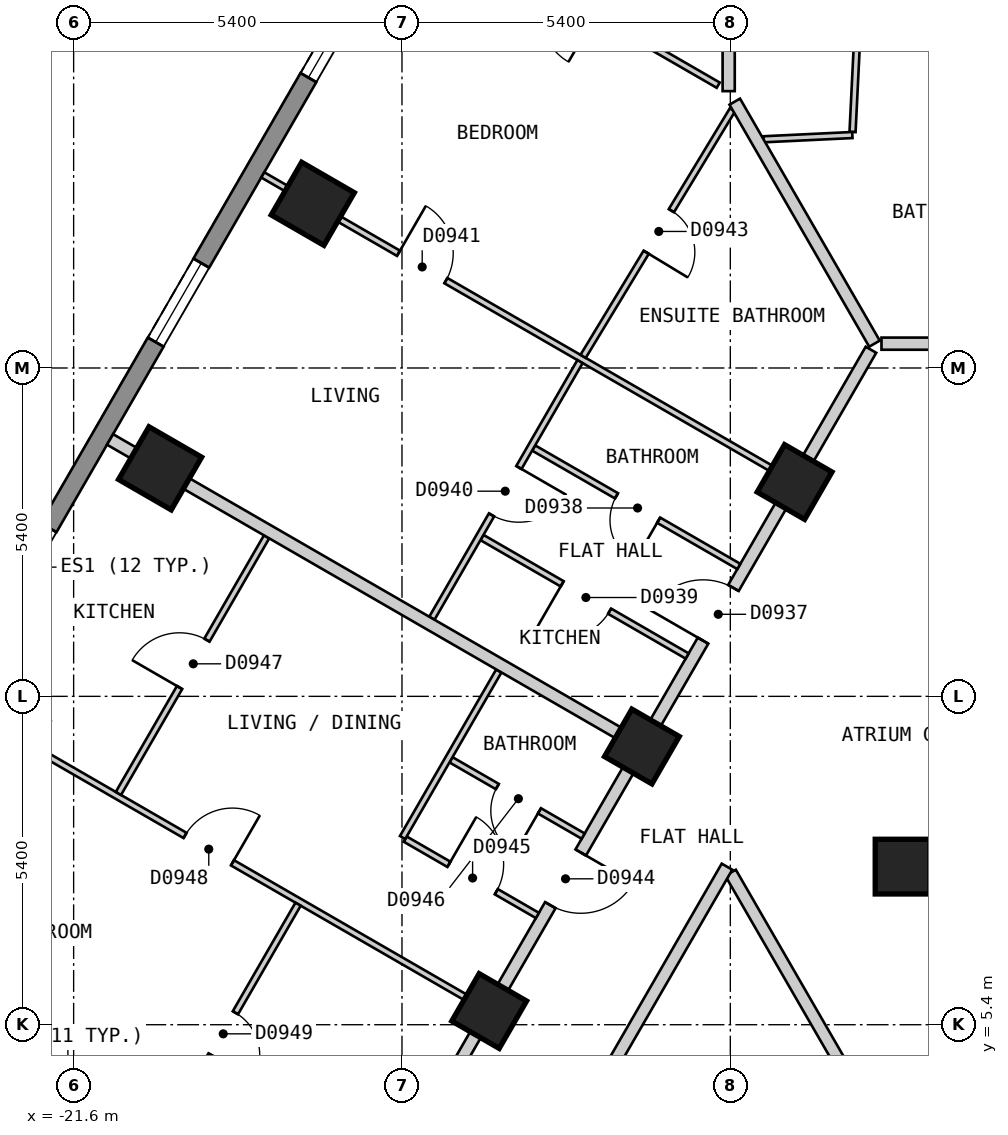
"""IFC4 building model, lengths in metres.
Left out: names, types, materials, properties, quantities, classifications, styles, units other than length and angle.
Written with IfcOpenShell. Run it as: python <this file> out.ifc"""

import sys

from ifc_helpers import new_model, si_unit, direction, frame, frame_2d, origin, origin_2d, place, context, subcontext, project, spatial, polyline, rectangle, outline, extrude, element, fill, save


model = new_model("IFC4")
c1 = context("Model", 3, precision=1e-05, world=origin(), true_north=direction((0.0, 1.0)))
c2 = subcontext(c1, "Body", "Model", "MODEL_VIEW")
j1 = project(units=[si_unit("LENGTHUNIT", "METRE"), si_unit("PLANEANGLEUNIT", "RADIAN")], contexts=[c1])
p1 = place(None, origin())
s1 = spatial("IfcSite", under=j1, at=p1, CompositionType="ELEMENT")
p2 = place(p1, origin())
s2 = spatial("IfcBuilding", under=s1, at=p2, CompositionType="ELEMENT")
p3 = place(p2, frame((0.0, 0.0, 102.0)))
s3 = spatial("IfcBuildingStorey", under=s2, at=p3, CompositionType="ELEMENT", Elevation=102.0)
for number, where, z_axis, x_axis in (
    (1, (-17.667, 18.9, 0.0), (0.0, 0.0, 1.0), (-0.5, -0.866, 0.0)),
    (2, (-20.178, 14.55, 0.0), (0.0, 0.0, 1.0), (-0.5, -0.866, 0.0)),
):
    element("IfcColumn", number, at=place(p3, frame(where, z_axis=z_axis, x_axis=x_axis)), inside=s3, PredefinedType="COLUMN", context=c2, shape_type="SweptSolid", body=[
        extrude(rectangle(XDim=1.0, YDim=1.0, at=origin_2d()), origin(), (0.0, 0.0, 1.0), 3.0),
    ])
for number, where, z_axis, x_axis in (
    (3, (-9.743, 14.325, 0.0), (0.0, 0.0, 1.0), (-0.5, -0.866, 0.0)),
    (4, (-7.967, 8.0, 0.0), (0.0, 0.0, 1.0), (1.0, 0.0, 0.0)),
    (5, (-12.254, 9.975, 0.0), (0.0, 0.0, 1.0), (-0.5, -0.866, 0.0)),
    (6, (-14.766, 5.625, 0.0), (0.0, 0.0, 1.0), (-0.5, -0.866, 0.0)),
):
    element("IfcColumn", number, at=place(p3, frame(where, z_axis=z_axis, x_axis=x_axis)), inside=s3, PredefinedType="COLUMN", context=c2, shape_type="SweptSolid", body=[
        extrude(rectangle(XDim=0.9, YDim=0.9, at=origin_2d()), origin(), (0.0, 0.0, 1.0), 3.0),
    ])
p4 = place(p3, frame((-15.747, 24.425, 0.0), z_axis=(0.0, 0.0, 1.0), x_axis=(-0.500027479704, -0.866009537788, 0.0)))
e7 = element("IfcWall", 7, at=p4, inside=s3, PredefinedType="SOLIDWALL", context=c2, shape_type="SweptSolid", body=[
    extrude(outline(polyline([(0.0, -0.15), (26.559, -0.15), (26.478, 0.15), (0.08, 0.15), (0.0, -0.15)])), origin(), (0.0, 0.0, 1.0), 2.7),
])
p5 = place(p4, frame((2.483, 0.0, 0.15)))
e8 = element("IfcOpeningElement", 8, at=p5, cuts=e7, PredefinedType="OPENING", context=c2, shape_type="SweptSolid", body=[
    extrude(rectangle(XDim=1.5, YDim=2.1, at=frame_2d((0.75, 1.05))), frame((0.0, 0.16, 0.0), z_axis=(0.0, -1.0, 0.0), x_axis=(1.0, 0.0, 0.0)), (0.0, 0.0, 1.0), 0.32),
])
p6 = place(p4, frame((7.506, 0.0, 0.15)))
e9 = element("IfcOpeningElement", 9, at=p6, cuts=e7, PredefinedType="OPENING", context=c2, shape_type="SweptSolid", body=[
    extrude(rectangle(XDim=1.5, YDim=2.1, at=frame_2d((0.75, 1.05))), frame((0.0, 0.16, 0.0), z_axis=(0.0, -1.0, 0.0), x_axis=(1.0, 0.0, 0.0)), (0.0, 0.0, 1.0), 0.32),
])
p7 = place(p4, frame((12.529, 0.0, 0.15)))
e10 = element("IfcOpeningElement", 10, at=p7, cuts=e7, PredefinedType="OPENING", context=c2, shape_type="SweptSolid", body=[
    extrude(rectangle(XDim=1.5, YDim=2.1, at=frame_2d((0.75, 1.05))), frame((0.0, 0.16, 0.0), z_axis=(0.0, -1.0, 0.0), x_axis=(1.0, 0.0, 0.0)), (0.0, 0.0, 1.0), 0.32),
])
p8 = place(p4, frame((17.552, 0.0, 0.15)))
e11 = element("IfcOpeningElement", 11, at=p8, cuts=e7, PredefinedType="OPENING", context=c2, shape_type="SweptSolid", body=[
    extrude(rectangle(XDim=1.5, YDim=2.1, at=frame_2d((0.75, 1.05))), frame((0.0, 0.16, 0.0), z_axis=(0.0, -1.0, 0.0), x_axis=(1.0, 0.0, 0.0)), (0.0, 0.0, 1.0), 0.32),
])
p9 = place(p4, frame((22.575, 0.0, 0.15)))
e12 = element("IfcOpeningElement", 12, at=p9, cuts=e7, PredefinedType="OPENING", context=c2, shape_type="SweptSolid", body=[
    extrude(rectangle(XDim=1.5, YDim=2.1, at=frame_2d((0.75, 1.05))), frame((0.0, 0.16, 0.0), z_axis=(0.0, -1.0, 0.0), x_axis=(1.0, 0.0, 0.0)), (0.0, 0.0, 1.0), 0.32),
])
p10 = place(p3, frame((-10.796, 7.899, 0.0), z_axis=(0.0, 0.0, 1.0), x_axis=(0.500010383074, -0.866019409031, 0.0)))
e13 = element("IfcWall", 13, at=p10, inside=s3, PredefinedType="PARTITIONING", context=c2, shape_type="SweptSolid", body=[
    extrude(rectangle(XDim=7.535, YDim=0.2, at=frame_2d((3.768, 0.0))), origin(), (0.0, 0.0, 1.0), 2.7),
])
p11 = place(p3, frame((-8.314, 16.6, 0.0), z_axis=(0.0, 0.0, 1.0), x_axis=(1.0, 0.0, 0.0)))
e14 = element("IfcWall", 14, at=p11, inside=s3, PredefinedType="PARTITIONING", context=c2, shape_type="SweptSolid", body=[
    extrude(rectangle(XDim=2.309, YDim=0.2, at=frame_2d((1.155, 0.0))), origin(), (0.0, 0.0, 1.0), 2.7),
])
p12 = place(p3, frame((-16.05, -1.0, 0.0), z_axis=(0.0, 0.0, 1.0), x_axis=(0.499962449088, 0.866047082728, 0.0)))
e15 = element("IfcWall", 15, at=p12, inside=s3, PredefinedType="PARTITIONING", context=c2, shape_type="SweptSolid", body=[
    extrude(rectangle(XDim=10.391, YDim=0.2, at=frame_2d((5.195, 0.0))), origin(), (0.0, 0.0, 1.0), 2.7),
])
p13 = place(p12, frame((4.745, 0.0, 0.0)))
e16 = element("IfcOpeningElement", 16, at=p13, cuts=e15, PredefinedType="OPENING", context=c2, shape_type="SweptSolid", body=[
    extrude(rectangle(XDim=0.9, YDim=2.1, at=frame_2d((0.45, 1.05))), frame((0.0, 0.11, 0.0), z_axis=(0.0, -1.0, 0.0), x_axis=(1.0, 0.0, 0.0)), (0.0, 0.0, 1.0), 0.22),
])
p14 = place(p3, frame((-18.562, -0.951, 0.0), z_axis=(0.0, 0.0, 1.0), x_axis=(0.499987097491, 0.866032852923, 0.0)))
e17 = element("IfcWall", 17, at=p14, inside=s3, PredefinedType="PARTITIONING", context=c2, shape_type="SweptSolid", body=[
    extrude(rectangle(XDim=20.15, YDim=0.2, at=frame_2d((10.075, 0.0))), origin(), (0.0, 0.0, 1.0), 2.7),
])
p15 = place(p14, frame((14.627, 0.0, 0.0)))
e18 = element("IfcOpeningElement", 18, at=p15, cuts=e17, PredefinedType="OPENING", context=c2, shape_type="SweptSolid", body=[
    extrude(rectangle(XDim=1.0, YDim=2.1, at=frame_2d((0.5, 1.05))), frame((0.0, 0.11, 0.0), z_axis=(0.0, -1.0, 0.0), x_axis=(1.0, 0.0, 0.0)), (0.0, 0.0, 1.0), 0.22),
])
p16 = place(p14, frame((9.604, 0.0, 0.0)))
e19 = element("IfcOpeningElement", 19, at=p16, cuts=e17, PredefinedType="OPENING", context=c2, shape_type="SweptSolid", body=[
    extrude(rectangle(XDim=1.0, YDim=2.1, at=frame_2d((0.5, 1.05))), frame((0.0, 0.11, 0.0), z_axis=(0.0, -1.0, 0.0), x_axis=(1.0, 0.0, 0.0)), (0.0, 0.0, 1.0), 0.22),
])
p17 = place(p3, frame((-16.146, 8.452, 0.0), z_axis=(0.0, 0.0, 1.0), x_axis=(0.865983051302, -0.500073349477, 0.0)))
e20 = element("IfcWall", 20, at=p17, inside=s3, PredefinedType="PARTITIONING", context=c2, shape_type="SweptSolid", body=[
    extrude(rectangle(XDim=2.509, YDim=0.1, at=frame_2d((1.255, 0.0))), origin(), (0.0, 0.0, 1.0), 2.7),
])
p18 = place(p17, frame((0.829, 0.0, 0.0)))
e21 = element("IfcOpeningElement", 21, at=p18, cuts=e20, PredefinedType="OPENING", context=c2, shape_type="SweptSolid", body=[
    extrude(rectangle(XDim=0.9, YDim=2.1, at=frame_2d((0.45, 1.05))), frame((0.0, 0.06, 0.0), z_axis=(0.0, -1.0, 0.0), x_axis=(1.0, 0.0, 0.0)), (0.0, 0.0, 1.0), 0.12),
])
p19 = place(p3, frame((-23.513, 10.675, 0.0), z_axis=(0.0, 0.0, 1.0), x_axis=(0.866041268327, -0.499972520799, 0.0)))
e22 = element("IfcWall", 22, at=p19, inside=s3, PredefinedType="PARTITIONING", context=c2, shape_type="SweptSolid", body=[
    extrude(rectangle(XDim=10.0, YDim=0.1, at=frame_2d((5.0, 0.0))), origin(), (0.0, 0.0, 1.0), 2.7),
])
p20 = place(p19, frame((4.325, 0.0, 0.0)))
e23 = element("IfcOpeningElement", 23, at=p20, cuts=e22, PredefinedType="OPENING", context=c2, shape_type="SweptSolid", body=[
    extrude(rectangle(XDim=0.9, YDim=2.1, at=frame_2d((0.45, 1.05))), frame((0.0, 0.06, 0.0), z_axis=(0.0, -1.0, 0.0), x_axis=(1.0, 0.0, 0.0)), (0.0, 0.0, 1.0), 0.12),
])
p21 = place(p3, frame((-14.884, 13.412, 0.0), z_axis=(0.0, 0.0, 1.0), x_axis=(0.866024880635, -0.500000906121, 0.0)))
e24 = element("IfcWall", 24, at=p21, inside=s3, PredefinedType="PARTITIONING", context=c2, shape_type="SweptSolid", body=[
    extrude(rectangle(XDim=3.896, YDim=0.1, at=frame_2d((1.948, 0.0))), origin(), (0.0, 0.0, 1.0), 2.7),
])
p22 = place(p21, frame((1.523, 0.0, 0.0)))
e25 = element("IfcOpeningElement", 25, at=p22, cuts=e24, PredefinedType="OPENING", context=c2, shape_type="SweptSolid", body=[
    extrude(rectangle(XDim=0.9, YDim=2.1, at=frame_2d((0.45, 1.05))), frame((0.0, 0.06, 0.0), z_axis=(0.0, -1.0, 0.0), x_axis=(1.0, 0.0, 0.0)), (0.0, 0.0, 1.0), 0.12),
])
p23 = place(p3, frame((-14.034, 14.884, 0.0), z_axis=(0.0, 0.0, 1.0), x_axis=(0.866024880635, -0.500000906121, 0.0)))
e26 = element("IfcWall", 26, at=p23, inside=s3, PredefinedType="PARTITIONING", context=c2, shape_type="SweptSolid", body=[
    extrude(rectangle(XDim=3.896, YDim=0.1, at=frame_2d((1.948, 0.0))), origin(), (0.0, 0.0, 1.0), 2.7),
])
p24 = place(p23, frame((1.573, 0.0, 0.0)))
e27 = element("IfcOpeningElement", 27, at=p24, cuts=e26, PredefinedType="OPENING", context=c2, shape_type="SweptSolid", body=[
    extrude(rectangle(XDim=0.8, YDim=2.1, at=frame_2d((0.4, 1.05))), frame((0.0, 0.06, 0.0), z_axis=(0.0, -1.0, 0.0), x_axis=(1.0, 0.0, 0.0)), (0.0, 0.0, 1.0), 0.12),
])
p25 = place(p3, frame((-15.394, 9.757, 0.0), z_axis=(0.0, 0.0, 1.0), x_axis=(0.866038211682, -0.499977815414, 0.0)))
e28 = element("IfcWall", 28, at=p25, inside=s3, PredefinedType="PARTITIONING", context=c2, shape_type="SweptSolid", body=[
    extrude(rectangle(XDim=2.51, YDim=0.1, at=frame_2d((1.255, 0.0))), origin(), (0.0, 0.0, 1.0), 2.7),
])
p26 = place(p25, frame((0.88, 0.0, 0.0)))
e29 = element("IfcOpeningElement", 29, at=p26, cuts=e28, PredefinedType="OPENING", context=c2, shape_type="SweptSolid", body=[
    extrude(rectangle(XDim=0.8, YDim=2.1, at=frame_2d((0.4, 1.05))), frame((0.0, 0.06, 0.0), z_axis=(0.0, -1.0, 0.0), x_axis=(1.0, 0.0, 0.0)), (0.0, 0.0, 1.0), 0.12),
])
p27 = place(p3, frame((-18.489, 19.375, 0.0), z_axis=(0.0, 0.0, 1.0), x_axis=(0.866016855193, -0.500014806302, 0.0)))
e30 = element("IfcWall", 30, at=p27, inside=s3, PredefinedType="PARTITIONING", context=c2, shape_type="SweptSolid", body=[
    extrude(rectangle(XDim=10.0, YDim=0.1, at=frame_2d((5.0, 0.0))), origin(), (0.0, 0.0, 1.0), 2.7),
])
p28 = place(p27, frame((2.577, 0.0, 0.0)))
e31 = element("IfcOpeningElement", 31, at=p28, cuts=e30, PredefinedType="OPENING", context=c2, shape_type="SweptSolid", body=[
    extrude(rectangle(XDim=0.9, YDim=2.1, at=frame_2d((0.45, 1.05))), frame((0.0, 0.06, 0.0), z_axis=(0.0, -1.0, 0.0), x_axis=(1.0, 0.0, 0.0)), (0.0, 0.0, 1.0), 0.12),
])
p29 = place(p3, frame((-15.977, 23.725, 0.0), z_axis=(0.0, 0.0, 1.0), x_axis=(0.866028566888, -0.499994521305, 0.0)))
e32 = element("IfcWall", 32, at=p29, inside=s3, PredefinedType="PARTITIONING", context=c2, shape_type="SweptSolid", body=[
    extrude(rectangle(XDim=5.748, YDim=0.1, at=frame_2d((2.874, 0.0))), origin(), (0.0, 0.0, 1.0), 2.7),
])
p30 = place(p29, frame((2.524, 0.0, 0.0)))
e33 = element("IfcOpeningElement", 33, at=p30, cuts=e32, PredefinedType="OPENING", context=c2, shape_type="SweptSolid", body=[
    extrude(rectangle(XDim=0.9, YDim=2.1, at=frame_2d((0.45, 1.05))), frame((0.0, 0.06, 0.0), z_axis=(0.0, -1.0, 0.0), x_axis=(1.0, 0.0, 0.0)), (0.0, 0.0, 1.0), 0.12),
])
p31 = place(p3, frame((-13.221, 16.391, 0.0), z_axis=(0.0, 0.0, 1.0), x_axis=(0.518164725284, 0.855280841286, 0.0)))
e34 = element("IfcWall", 34, at=p31, inside=s3, PredefinedType="PARTITIONING", context=c2, shape_type="SweptSolid", body=[
    extrude(rectangle(XDim=4.74, YDim=0.1, at=frame_2d((2.37, 0.0))), origin(), (0.0, 0.0, 1.0), 2.7),
])
p32 = place(p31, frame((2.002, 0.0, 0.0)))
e35 = element("IfcOpeningElement", 35, at=p32, cuts=e34, PredefinedType="OPENING", context=c2, shape_type="SweptSolid", body=[
    extrude(rectangle(XDim=0.8, YDim=2.1, at=frame_2d((0.4, 1.05))), frame((0.0, 0.06, 0.0), z_axis=(0.0, -1.0, 0.0), x_axis=(1.0, 0.0, 0.0)), (0.0, 0.0, 1.0), 0.12),
])
p33 = place(p3, frame((-16.19, 8.478, 0.0), z_axis=(0.0, 0.0, 1.0), x_axis=(0.500156715107, 0.865934905367, 0.0)))
e36 = element("IfcWall", 36, at=p33, inside=s3, PredefinedType="PARTITIONING", context=c2, shape_type="SweptSolid", body=[
    extrude(rectangle(XDim=3.163, YDim=0.1, at=frame_2d((1.582, 0.0))), origin(), (0.0, 0.0, 1.0), 2.7),
])
p34 = place(p3, frame((-20.345, 3.162, 0.0), z_axis=(0.0, 0.0, 1.0), x_axis=(0.499943653708, 0.866057932887, 0.0)))
e37 = element("IfcWall", 37, at=p34, inside=s3, PredefinedType="PARTITIONING", context=c2, shape_type="SweptSolid", body=[
    extrude(rectangle(XDim=4.873, YDim=0.1, at=frame_2d((2.436, 0.0))), origin(), (0.0, 0.0, 1.0), 2.7),
])
p35 = place(p34, frame((2.011, 0.0, 0.0)))
e38 = element("IfcOpeningElement", 38, at=p35, cuts=e37, PredefinedType="OPENING", context=c2, shape_type="SweptSolid", body=[
    extrude(rectangle(XDim=0.8, YDim=2.1, at=frame_2d((0.4, 1.05))), frame((0.0, 0.06, 0.0), z_axis=(0.0, -1.0, 0.0), x_axis=(1.0, 0.0, 0.0)), (0.0, 0.0, 1.0), 0.12),
])
p36 = place(p3, frame((-15.708, 12.085, 0.0), z_axis=(0.0, 0.0, 1.0), x_axis=(0.499943653708, 0.866057932887, 0.0)))
e39 = element("IfcWall", 39, at=p36, inside=s3, PredefinedType="PARTITIONING", context=c2, shape_type="SweptSolid", body=[
    extrude(rectangle(XDim=4.873, YDim=0.1, at=frame_2d((2.436, 0.0))), origin(), (0.0, 0.0, 1.0), 2.7),
])
p37 = place(p36, frame((1.962, 0.0, 0.0)))
e40 = element("IfcOpeningElement", 40, at=p37, cuts=e39, PredefinedType="OPENING", context=c2, shape_type="SweptSolid", body=[
    extrude(rectangle(XDim=0.9, YDim=2.1, at=frame_2d((0.45, 1.05))), frame((0.0, 0.06, 0.0), z_axis=(0.0, -1.0, 0.0), x_axis=(1.0, 0.0, 0.0)), (0.0, 0.0, 1.0), 0.12),
])
p38 = place(p3, frame((-20.864, 9.203, 0.0), z_axis=(0.0, 0.0, 1.0), x_axis=(0.500072260509, 0.86598368014, 0.0)))
e41 = element("IfcWall", 41, at=p38, inside=s3, PredefinedType="PARTITIONING", context=c2, shape_type="SweptSolid", body=[
    extrude(rectangle(XDim=4.873, YDim=0.1, at=frame_2d((2.437, 0.0))), origin(), (0.0, 0.0, 1.0), 2.7),
])
p39 = place(p38, frame((2.012, 0.0, 0.0)))
e42 = element("IfcOpeningElement", 42, at=p39, cuts=e41, PredefinedType="OPENING", context=c2, shape_type="SweptSolid", body=[
    extrude(rectangle(XDim=0.9, YDim=2.1, at=frame_2d((0.45, 1.05))), frame((0.0, 0.06, 0.0), z_axis=(0.0, -1.0, 0.0), x_axis=(1.0, 0.0, 0.0)), (0.0, 0.0, 1.0), 0.12),
])
p40 = place(p3, frame((-8.79, 20.081, 0.0), z_axis=(0.0, 0.0, 1.0), x_axis=(0.049097109821, 0.998794009697, 0.0)))
e43 = element("IfcWall", 43, at=p40, inside=s3, PredefinedType="PARTITIONING", context=c2, shape_type="SweptSolid", body=[
    extrude(rectangle(XDim=1.507, YDim=0.1, at=frame_2d((0.753, 0.0))), origin(), (0.0, 0.0, 1.0), 2.7),
])
p41 = place(p3, frame((-10.254, 19.961, 0.0), z_axis=(0.0, 0.0, 1.0), x_axis=(0.998851840647, 0.047906162812, 0.0)))
e44 = element("IfcWall", 44, at=p41, inside=s3, PredefinedType="PARTITIONING", context=c2, shape_type="SweptSolid", body=[
    extrude(rectangle(XDim=1.463, YDim=0.1, at=frame_2d((0.731, 0.0))), origin(), (0.0, 0.0, 1.0), 2.7),
])
p42 = place(p3, frame((-10.727, 20.58, 0.0), z_axis=(0.0, 0.0, 1.0), x_axis=(0.500041272028, -0.866001574057, 0.0)))
e45 = element("IfcWall", 45, at=p42, inside=s3, PredefinedType="PARTITIONING", context=c2, shape_type="SweptSolid", body=[
    extrude(rectangle(XDim=4.596, YDim=0.2, at=frame_2d((2.298, 0.0))), origin(), (0.0, 0.0, 1.0), 2.7),
])
p43 = place(p3, frame((-26.025, 6.325, 0.0), z_axis=(0.0, 0.0, 1.0), x_axis=(0.866041268327, -0.499972520799, 0.0)))
e46 = element("IfcWall", 46, at=p43, inside=s3, PredefinedType="PARTITIONING", context=c2, shape_type="SweptSolid", body=[
    extrude(rectangle(XDim=10.0, YDim=0.2, at=frame_2d((5.0, 0.0))), origin(), (0.0, 0.0, 1.0), 2.7),
])
p44 = place(p3, frame((-21.001, 15.025, 0.0), z_axis=(0.0, 0.0, 1.0), x_axis=(0.866016855193, -0.500014806302, 0.0)))
e47 = element("IfcWall", 47, at=p44, inside=s3, PredefinedType="PARTITIONING", context=c2, shape_type="SweptSolid", body=[
    extrude(rectangle(XDim=10.0, YDim=0.2, at=frame_2d((5.0, 0.0))), origin(), (0.0, 0.0, 1.0), 2.7),
])
p45 = place(p3, frame((-10.827, 20.753, 0.0), z_axis=(0.0, 0.0, 1.0), x_axis=(0.0, 1.0, 0.0)))
e48 = element("IfcWall", 48, at=p45, inside=s3, PredefinedType="PARTITIONING", context=c2, shape_type="SweptSolid", body=[
    extrude(rectangle(XDim=5.947, YDim=0.2, at=frame_2d((2.974, 0.0))), origin(), (0.0, 0.0, 1.0), 2.7),
])
p46 = place(p5, origin())
e49 = element("IfcWindow", 49, at=p46, inside=s3, PartitioningType="SINGLE_PANEL", PredefinedType="WINDOW", context=c2, shape_type="SweptSolid", body=[
    extrude(rectangle(XDim=1.5, YDim=2.1, at=frame_2d((0.75, 1.05))), frame((0.0, 0.03, 0.0), z_axis=(0.0, -1.0, 0.0), x_axis=(1.0, 0.0, 0.0)), (0.0, 0.0, 1.0), 0.06),
])
fill(e8, e49)
p47 = place(p6, origin())
e50 = element("IfcWindow", 50, at=p47, inside=s3, PartitioningType="SINGLE_PANEL", PredefinedType="WINDOW", context=c2, shape_type="SweptSolid", body=[
    extrude(rectangle(XDim=1.5, YDim=2.1, at=frame_2d((0.75, 1.05))), frame((0.0, 0.03, 0.0), z_axis=(0.0, -1.0, 0.0), x_axis=(1.0, 0.0, 0.0)), (0.0, 0.0, 1.0), 0.06),
])
fill(e9, e50)
p48 = place(p15, origin())
e51 = element("IfcDoor", 51, at=p48, inside=s3, OperationType="SINGLE_SWING_LEFT", PredefinedType="DOOR", context=c2, shape_type="SweptSolid", body=[
    extrude(rectangle(XDim=1.0, YDim=2.1, at=frame_2d((0.5, 1.05))), frame((0.0, 0.025, 0.0), z_axis=(0.0, -1.0, 0.0), x_axis=(1.0, 0.0, 0.0)), (0.0, 0.0, 1.0), 0.05),
])
fill(e18, e51)
p49 = place(p24, origin())
e52 = element("IfcDoor", 52, at=p49, inside=s3, OperationType="SINGLE_SWING_RIGHT", PredefinedType="DOOR", context=c2, shape_type="SweptSolid", body=[
    extrude(rectangle(XDim=0.8, YDim=2.1, at=frame_2d((0.4, 1.05))), frame((0.0, 0.025, 0.0), z_axis=(0.0, -1.0, 0.0), x_axis=(1.0, 0.0, 0.0)), (0.0, 0.0, 1.0), 0.05),
])
fill(e27, e52)
p50 = place(p22, origin())
e53 = element("IfcDoor", 53, at=p50, inside=s3, OperationType="SINGLE_SWING_LEFT", PredefinedType="DOOR", context=c2, shape_type="SweptSolid", body=[
    extrude(rectangle(XDim=0.9, YDim=2.1, at=frame_2d((0.45, 1.05))), frame((0.0, 0.025, 0.0), z_axis=(0.0, -1.0, 0.0), x_axis=(1.0, 0.0, 0.0)), (0.0, 0.0, 1.0), 0.05),
])
fill(e25, e53)
p51 = place(p37, origin())
e54 = element("IfcDoor", 54, at=p51, inside=s3, OperationType="SINGLE_SWING_RIGHT", PredefinedType="DOOR", context=c2, shape_type="SweptSolid", body=[
    extrude(rectangle(XDim=0.9, YDim=2.1, at=frame_2d((0.45, 1.05))), frame((0.0, 0.025, 0.0), z_axis=(0.0, -1.0, 0.0), x_axis=(1.0, 0.0, 0.0)), (0.0, 0.0, 1.0), 0.05),
])
fill(e40, e54)
p52 = place(p28, origin())
e55 = element("IfcDoor", 55, at=p52, inside=s3, OperationType="SINGLE_SWING_LEFT", PredefinedType="DOOR", context=c2, shape_type="SweptSolid", body=[
    extrude(rectangle(XDim=0.9, YDim=2.1, at=frame_2d((0.45, 1.05))), frame((0.0, 0.025, 0.0), z_axis=(0.0, -1.0, 0.0), x_axis=(1.0, 0.0, 0.0)), (0.0, 0.0, 1.0), 0.05),
])
fill(e31, e55)
p53 = place(p32, origin())
e56 = element("IfcDoor", 56, at=p53, inside=s3, OperationType="SINGLE_SWING_LEFT", PredefinedType="DOOR", context=c2, shape_type="SweptSolid", body=[
    extrude(rectangle(XDim=0.8, YDim=2.1, at=frame_2d((0.4, 1.05))), frame((0.0, 0.025, 0.0), z_axis=(0.0, -1.0, 0.0), x_axis=(1.0, 0.0, 0.0)), (0.0, 0.0, 1.0), 0.05),
])
fill(e35, e56)
p54 = place(p16, origin())
e57 = element("IfcDoor", 57, at=p54, inside=s3, OperationType="SINGLE_SWING_RIGHT", PredefinedType="DOOR", context=c2, shape_type="SweptSolid", body=[
    extrude(rectangle(XDim=1.0, YDim=2.1, at=frame_2d((0.5, 1.05))), frame((0.0, 0.025, 0.0), z_axis=(0.0, -1.0, 0.0), x_axis=(1.0, 0.0, 0.0)), (0.0, 0.0, 1.0), 0.05),
])
fill(e19, e57)
p55 = place(p18, origin())
e58 = element("IfcDoor", 58, at=p55, inside=s3, OperationType="SINGLE_SWING_LEFT", PredefinedType="DOOR", context=c2, shape_type="SweptSolid", body=[
    extrude(rectangle(XDim=0.9, YDim=2.1, at=frame_2d((0.45, 1.05))), frame((0.0, 0.025, 0.0), z_axis=(0.0, -1.0, 0.0), x_axis=(1.0, 0.0, 0.0)), (0.0, 0.0, 1.0), 0.05),
])
fill(e21, e58)
p56 = place(p26, origin())
e59 = element("IfcDoor", 59, at=p56, inside=s3, OperationType="SINGLE_SWING_RIGHT", PredefinedType="DOOR", context=c2, shape_type="SweptSolid", body=[
    extrude(rectangle(XDim=0.8, YDim=2.1, at=frame_2d((0.4, 1.05))), frame((0.0, 0.025, 0.0), z_axis=(0.0, -1.0, 0.0), x_axis=(1.0, 0.0, 0.0)), (0.0, 0.0, 1.0), 0.05),
])
fill(e29, e59)
p57 = place(p39, origin())
e60 = element("IfcDoor", 60, at=p57, inside=s3, OperationType="SINGLE_SWING_LEFT", PredefinedType="DOOR", context=c2, shape_type="SweptSolid", body=[
    extrude(rectangle(XDim=0.9, YDim=2.1, at=frame_2d((0.45, 1.05))), frame((0.0, 0.025, 0.0), z_axis=(0.0, -1.0, 0.0), x_axis=(1.0, 0.0, 0.0)), (0.0, 0.0, 1.0), 0.05),
])
fill(e42, e60)
p58 = place(p20, origin())
e61 = element("IfcDoor", 61, at=p58, inside=s3, OperationType="SINGLE_SWING_RIGHT", PredefinedType="DOOR", context=c2, shape_type="SweptSolid", body=[
    extrude(rectangle(XDim=0.9, YDim=2.1, at=frame_2d((0.45, 1.05))), frame((0.0, 0.025, 0.0), z_axis=(0.0, -1.0, 0.0), x_axis=(1.0, 0.0, 0.0)), (0.0, 0.0, 1.0), 0.05),
])
fill(e23, e61)
p59 = place(p35, origin())
e62 = element("IfcDoor", 62, at=p59, inside=s3, OperationType="SINGLE_SWING_LEFT", PredefinedType="DOOR", context=c2, shape_type="SweptSolid", body=[
    extrude(rectangle(XDim=0.8, YDim=2.1, at=frame_2d((0.4, 1.05))), frame((0.0, 0.025, 0.0), z_axis=(0.0, -1.0, 0.0), x_axis=(1.0, 0.0, 0.0)), (0.0, 0.0, 1.0), 0.05),
])
fill(e38, e62)
save(model, sys.argv[1])
